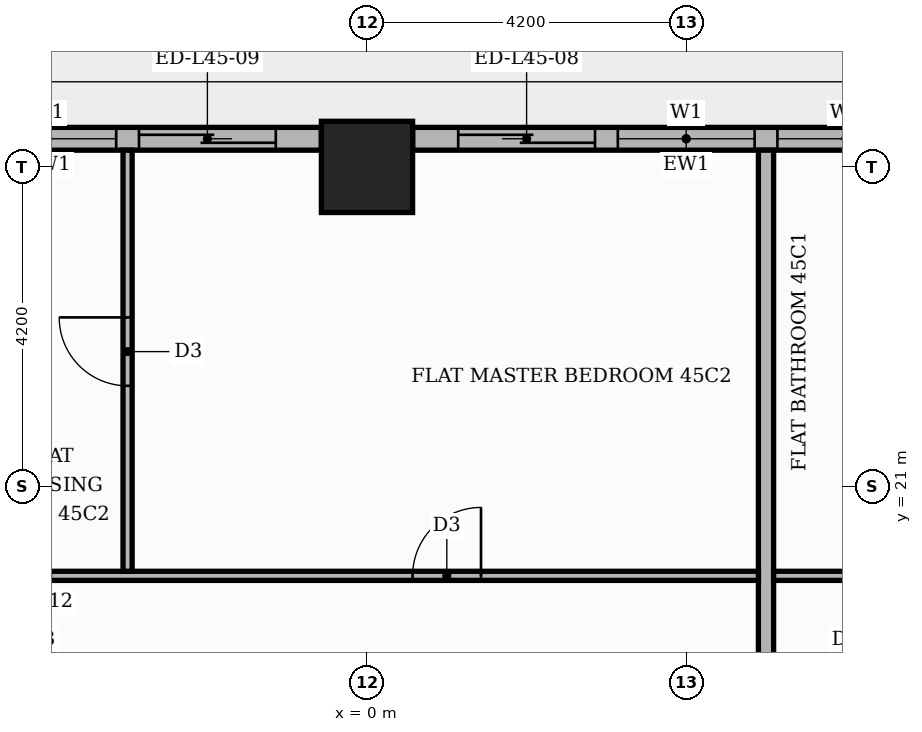
"""IFC4 building model, lengths in metres.
Left out: names, types, materials, properties, quantities, classifications, styles, units other than length and angle.
Written with IfcOpenShell. Run it as: python <this file> out.ifc"""

import sys

from ifc_helpers import new_model, si_unit, direction, frame, frame_2d, origin, origin_2d, place, context, subcontext, project, spatial, rectangle, extrude, element, fill, save


model = new_model("IFC4")
c1 = context("Model", 3, precision=1e-05, world=origin(), true_north=direction((0.0, 1.0)))
c2 = subcontext(c1, "Body", "Model", "MODEL_VIEW")
j1 = project(units=[si_unit("LENGTHUNIT", "METRE"), si_unit("PLANEANGLEUNIT", "RADIAN")], contexts=[c1])
p1 = place(None, origin())
s1 = spatial("IfcSite", under=j1, at=p1, CompositionType="ELEMENT")
p2 = place(p1, origin())
s2 = spatial("IfcBuilding", under=s1, at=p2, CompositionType="ELEMENT")
p3 = place(p2, frame((0.0, 0.0, 192.3)))
s3 = spatial("IfcBuildingStorey", under=s2, at=p3, CompositionType="ELEMENT", Elevation=192.3)
p4 = place(p3, frame((0.0, 25.2, 0.0), z_axis=(0.0, 0.0, 1.0), x_axis=(1.0, 0.0, 0.0)))
e1 = element("IfcColumn", 1, at=p4, inside=s3, PredefinedType="COLUMN", context=c2, shape_type="SweptSolid", body=[
    extrude(rectangle(XDim=1.2, YDim=1.2, at=origin_2d()), origin(), (0.0, 0.0, 1.0), 3.9),
])
p5 = place(p3, frame((7.8, 25.57, 0.0), z_axis=(0.0, 0.0, 1.0), x_axis=(-1.0, 0.0, 0.0)))
e2 = element("IfcWall", 2, at=p5, inside=s3, PredefinedType="STANDARD", context=c2, shape_type="SweptSolid", body=[
    extrude(rectangle(XDim=7.2, YDim=0.3, at=frame_2d((3.6, 0.0))), origin(), (0.0, 0.0, 1.0), 3.48),
])
p6 = place(p5, frame((0.6, 0.0, 0.9)))
e3 = element("IfcOpeningElement", 3, at=p6, cuts=e2, PredefinedType="OPENING", context=c2, shape_type="SweptSolid", body=[
    extrude(rectangle(XDim=1.8, YDim=2.1, at=frame_2d((0.9, 1.05))), frame((0.0, 0.16, 0.0), z_axis=(0.0, -1.0, 0.0), x_axis=(1.0, 0.0, 0.0)), (0.0, 0.0, 1.0), 0.32),
])
p7 = place(p5, frame((2.7, 0.0, 0.9)))
e4 = element("IfcOpeningElement", 4, at=p7, cuts=e2, PredefinedType="OPENING", context=c2, shape_type="SweptSolid", body=[
    extrude(rectangle(XDim=1.8, YDim=2.1, at=frame_2d((0.9, 1.05))), frame((0.0, 0.16, 0.0), z_axis=(0.0, -1.0, 0.0), x_axis=(1.0, 0.0, 0.0)), (0.0, 0.0, 1.0), 0.32),
])
p8 = place(p5, frame((4.8, 0.0, 0.0)))
e5 = element("IfcOpeningElement", 5, at=p8, cuts=e2, PredefinedType="OPENING", context=c2, shape_type="SweptSolid", body=[
    extrude(rectangle(XDim=1.8, YDim=2.4, at=frame_2d((0.9, 1.2))), frame((0.0, 0.16, 0.0), z_axis=(0.0, -1.0, 0.0), x_axis=(1.0, 0.0, 0.0)), (0.0, 0.0, 1.0), 0.32),
])
p9 = place(p3, frame((-0.6, 25.57, 0.0), z_axis=(0.0, 0.0, 1.0), x_axis=(-1.0, 0.0, 0.0)))
e6 = element("IfcWall", 6, at=p9, inside=s3, PredefinedType="STANDARD", context=c2, shape_type="SweptSolid", body=[
    extrude(rectangle(XDim=7.2, YDim=0.3, at=frame_2d((3.6, 0.0))), origin(), (0.0, 0.0, 1.0), 3.48),
])
p10 = place(p9, frame((0.6, 0.0, 0.0)))
e7 = element("IfcOpeningElement", 7, at=p10, cuts=e6, PredefinedType="OPENING", context=c2, shape_type="SweptSolid", body=[
    extrude(rectangle(XDim=1.8, YDim=2.4, at=frame_2d((0.9, 1.2))), frame((0.0, 0.16, 0.0), z_axis=(0.0, -1.0, 0.0), x_axis=(1.0, 0.0, 0.0)), (0.0, 0.0, 1.0), 0.32),
])
p11 = place(p9, frame((2.7, 0.0, 0.9)))
e8 = element("IfcOpeningElement", 8, at=p11, cuts=e6, PredefinedType="OPENING", context=c2, shape_type="SweptSolid", body=[
    extrude(rectangle(XDim=1.8, YDim=2.1, at=frame_2d((0.9, 1.05))), frame((0.0, 0.16, 0.0), z_axis=(0.0, -1.0, 0.0), x_axis=(1.0, 0.0, 0.0)), (0.0, 0.0, 1.0), 0.32),
])
p12 = place(p9, frame((4.8, 0.0, 0.9)))
e9 = element("IfcOpeningElement", 9, at=p12, cuts=e6, PredefinedType="OPENING", context=c2, shape_type="SweptSolid", body=[
    extrude(rectangle(XDim=1.8, YDim=2.1, at=frame_2d((0.9, 1.05))), frame((0.0, 0.16, 0.0), z_axis=(0.0, -1.0, 0.0), x_axis=(1.0, 0.0, 0.0)), (0.0, 0.0, 1.0), 0.32),
])
p13 = place(p3, frame((5.25, 13.75, 0.0), z_axis=(0.0, 0.0, 1.0), x_axis=(0.0, 1.0, 0.0)))
e10 = element("IfcWall", 10, at=p13, inside=s3, PredefinedType="PARTITIONING", context=c2, shape_type="SweptSolid", body=[
    extrude(rectangle(XDim=11.67, YDim=0.2, at=frame_2d((5.835, 0.0))), origin(), (0.0, 0.0, 1.0), 3.48),
])
p14 = place(p3, frame((-13.55, 19.82, 0.0), z_axis=(0.0, 0.0, 1.0), x_axis=(1.0, 0.0, 0.0)))
e11 = element("IfcWall", 11, at=p14, inside=s3, PredefinedType="PARTITIONING", context=c2, shape_type="SweptSolid", body=[
    extrude(rectangle(XDim=18.7, YDim=0.12, at=frame_2d((9.35, 0.0))), origin(), (0.0, 0.0, 1.0), 3.48),
])
p15 = place(p14, frame((14.15, 0.0, 0.0)))
e12 = element("IfcOpeningElement", 12, at=p15, cuts=e11, PredefinedType="OPENING", context=c2, shape_type="SweptSolid", body=[
    extrude(rectangle(XDim=0.9, YDim=2.1, at=frame_2d((0.45, 1.05))), frame((0.0, 0.07, 0.0), z_axis=(0.0, -1.0, 0.0), x_axis=(1.0, 0.0, 0.0)), (0.0, 0.0, 1.0), 0.14),
])
p16 = place(p14, frame((2.55, 0.0, 0.0)))
e13 = element("IfcOpeningElement", 13, at=p16, cuts=e11, PredefinedType="OPENING", context=c2, shape_type="SweptSolid", body=[
    extrude(rectangle(XDim=1.0, YDim=2.1, at=frame_2d((0.5, 1.05))), frame((0.0, 0.07, 0.0), z_axis=(0.0, -1.0, 0.0), x_axis=(1.0, 0.0, 0.0)), (0.0, 0.0, 1.0), 0.14),
])
p17 = place(p3, frame((5.35, 19.82, 0.0), z_axis=(0.0, 0.0, 1.0), x_axis=(1.0, 0.0, 0.0)))
e14 = element("IfcWall", 14, at=p17, inside=s3, PredefinedType="PARTITIONING", context=c2, shape_type="SweptSolid", body=[
    extrude(rectangle(XDim=12.25, YDim=0.12, at=frame_2d((6.125, 0.0))), origin(), (0.0, 0.0, 1.0), 3.48),
])
p18 = place(p17, frame((8.85, 0.0, 0.0)))
e15 = element("IfcOpeningElement", 15, at=p18, cuts=e14, PredefinedType="OPENING", context=c2, shape_type="SweptSolid", body=[
    extrude(rectangle(XDim=1.0, YDim=2.1, at=frame_2d((0.5, 1.05))), frame((0.0, 0.07, 0.0), z_axis=(0.0, -1.0, 0.0), x_axis=(1.0, 0.0, 0.0)), (0.0, 0.0, 1.0), 0.14),
])
p19 = place(p17, frame((5.75, 0.0, 0.0)))
e16 = element("IfcOpeningElement", 16, at=p19, cuts=e14, PredefinedType="OPENING", context=c2, shape_type="SweptSolid", body=[
    extrude(rectangle(XDim=0.9, YDim=2.1, at=frame_2d((0.45, 1.05))), frame((0.0, 0.07, 0.0), z_axis=(0.0, -1.0, 0.0), x_axis=(1.0, 0.0, 0.0)), (0.0, 0.0, 1.0), 0.14),
])
p20 = place(p3, frame((-3.15, 19.88, 0.0), z_axis=(0.0, 0.0, 1.0), x_axis=(0.0, 1.0, 0.0)))
e17 = element("IfcWall", 17, at=p20, inside=s3, PredefinedType="PARTITIONING", context=c2, shape_type="SweptSolid", body=[
    extrude(rectangle(XDim=5.54, YDim=0.12, at=frame_2d((2.77, 0.0))), origin(), (0.0, 0.0, 1.0), 3.48),
])
p21 = place(p20, frame((2.44, 0.0, 0.0)))
e18 = element("IfcOpeningElement", 18, at=p21, cuts=e17, PredefinedType="OPENING", context=c2, shape_type="SweptSolid", body=[
    extrude(rectangle(XDim=0.9, YDim=2.1, at=frame_2d((0.45, 1.05))), frame((0.0, 0.07, 0.0), z_axis=(0.0, -1.0, 0.0), x_axis=(1.0, 0.0, 0.0)), (0.0, 0.0, 1.0), 0.14),
])
p22 = place(p6, origin())
e19 = element("IfcWindow", 19, at=p22, inside=s3, PartitioningType="SINGLE_PANEL", PredefinedType="WINDOW", context=c2, shape_type="SweptSolid", body=[
    extrude(rectangle(XDim=1.8, YDim=2.1, at=frame_2d((0.9, 1.05))), frame((0.0, 0.03, 0.0), z_axis=(0.0, -1.0, 0.0), x_axis=(1.0, 0.0, 0.0)), (0.0, 0.0, 1.0), 0.06),
])
fill(e3, e19)
p23 = place(p7, origin())
e20 = element("IfcWindow", 20, at=p23, inside=s3, PartitioningType="SINGLE_PANEL", PredefinedType="WINDOW", context=c2, shape_type="SweptSolid", body=[
    extrude(rectangle(XDim=1.8, YDim=2.1, at=frame_2d((0.9, 1.05))), frame((0.0, 0.03, 0.0), z_axis=(0.0, -1.0, 0.0), x_axis=(1.0, 0.0, 0.0)), (0.0, 0.0, 1.0), 0.06),
])
fill(e4, e20)
p24 = place(p8, origin())
e21 = element("IfcDoor", 21, at=p24, inside=s3, OperationType="SLIDING_TO_RIGHT", PredefinedType="DOOR", context=c2, shape_type="SweptSolid", body=[
    extrude(rectangle(XDim=1.8, YDim=2.4, at=frame_2d((0.9, 1.2))), frame((0.0, 0.025, 0.0), z_axis=(0.0, -1.0, 0.0), x_axis=(1.0, 0.0, 0.0)), (0.0, 0.0, 1.0), 0.05),
])
fill(e5, e21)
p25 = place(p10, origin())
e22 = element("IfcDoor", 22, at=p25, inside=s3, OperationType="SLIDING_TO_LEFT", PredefinedType="DOOR", context=c2, shape_type="SweptSolid", body=[
    extrude(rectangle(XDim=1.8, YDim=2.4, at=frame_2d((0.9, 1.2))), frame((0.0, 0.025, 0.0), z_axis=(0.0, -1.0, 0.0), x_axis=(1.0, 0.0, 0.0)), (0.0, 0.0, 1.0), 0.05),
])
fill(e7, e22)
p26 = place(p11, origin())
e23 = element("IfcWindow", 23, at=p26, inside=s3, PartitioningType="SINGLE_PANEL", PredefinedType="WINDOW", context=c2, shape_type="SweptSolid", body=[
    extrude(rectangle(XDim=1.8, YDim=2.1, at=frame_2d((0.9, 1.05))), frame((0.0, 0.03, 0.0), z_axis=(0.0, -1.0, 0.0), x_axis=(1.0, 0.0, 0.0)), (0.0, 0.0, 1.0), 0.06),
])
fill(e8, e23)
p27 = place(p15, origin())
e24 = element("IfcDoor", 24, at=p27, inside=s3, OperationType="SINGLE_SWING_RIGHT", PredefinedType="DOOR", context=c2, shape_type="SweptSolid", body=[
    extrude(rectangle(XDim=0.9, YDim=2.1, at=frame_2d((0.45, 1.05))), frame((0.0, 0.025, 0.0), z_axis=(0.0, -1.0, 0.0), x_axis=(1.0, 0.0, 0.0)), (0.0, 0.0, 1.0), 0.05),
])
fill(e12, e24)
p28 = place(p21, origin())
e25 = element("IfcDoor", 25, at=p28, inside=s3, OperationType="SINGLE_SWING_RIGHT", PredefinedType="DOOR", context=c2, shape_type="SweptSolid", body=[
    extrude(rectangle(XDim=0.9, YDim=2.1, at=frame_2d((0.45, 1.05))), frame((0.0, 0.025, 0.0), z_axis=(0.0, -1.0, 0.0), x_axis=(1.0, 0.0, 0.0)), (0.0, 0.0, 1.0), 0.05),
])
fill(e18, e25)
save(model, sys.argv[1])
